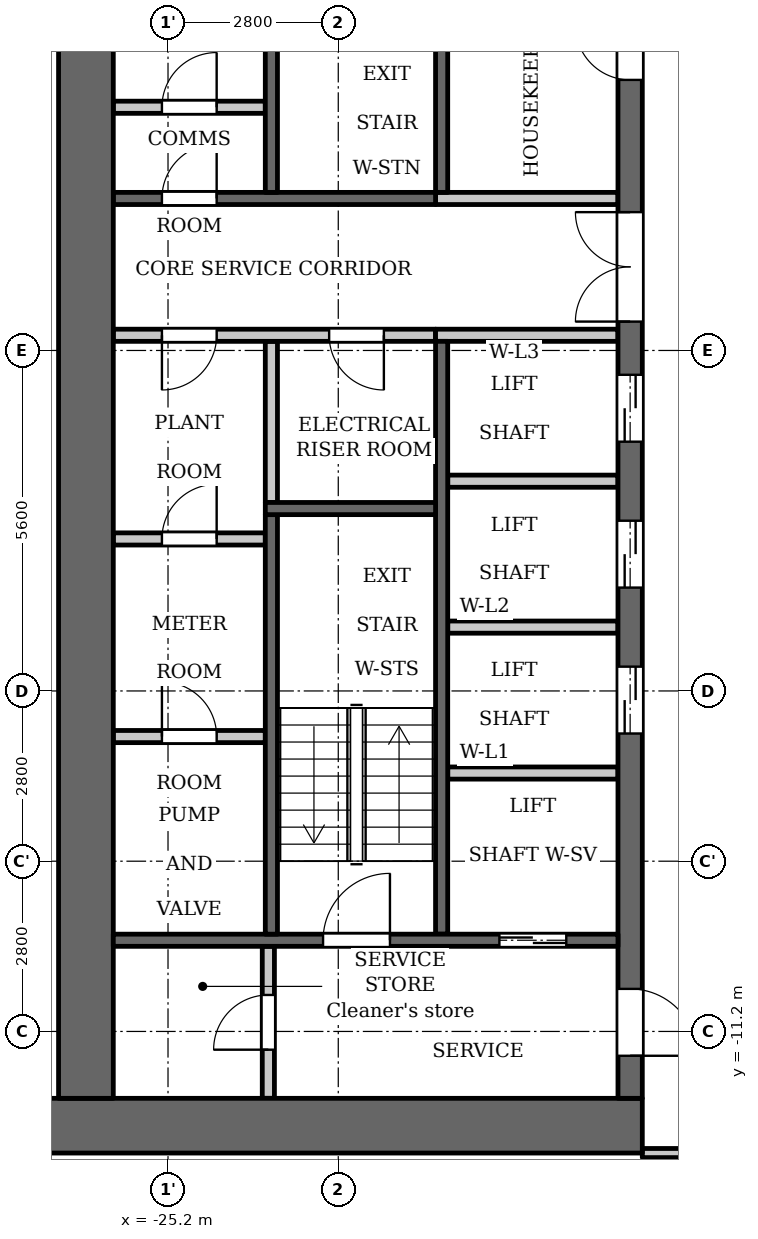
"""IFC4 building model, lengths in metres.
Left out: names, types, materials, properties, quantities, classifications, styles, units other than length and angle.
Written with IfcOpenShell. Run it as: python <this file> out.ifc"""

import sys

from ifc_helpers import new_model, si_unit, direction, frame, frame_2d, origin, place, context, subcontext, project, spatial, rectangle, extrude, element, fill, save


model = new_model("IFC4")
c1 = context("Model", 3, precision=1e-05, world=origin(), true_north=direction((0.0, 1.0)))
c2 = subcontext(c1, "Body", "Model", "MODEL_VIEW")
j1 = project(units=[si_unit("LENGTHUNIT", "METRE"), si_unit("PLANEANGLEUNIT", "RADIAN")], contexts=[c1])
p1 = place(None, origin())
s1 = spatial("IfcSite", under=j1, at=p1, CompositionType="ELEMENT")
p2 = place(p1, origin())
s2 = spatial("IfcBuilding", under=s1, at=p2, CompositionType="ELEMENT")
p3 = place(p2, frame((0.0, 0.0, 114.8)))
s3 = spatial("IfcBuildingStorey", under=s2, at=p3, CompositionType="ELEMENT", Elevation=114.8)
p4 = place(p3, frame((-23.5, -2.5, 0.0), z_axis=(0.0, 0.0, 1.0), x_axis=(0.0, 1.0, 0.0)))
e1 = element("IfcWall", 1, at=p4, inside=s3, PredefinedType="PARTITIONING", context=c2, shape_type="SweptSolid", body=[
    extrude(rectangle(XDim=2.65, YDim=0.2, at=frame_2d((1.325, 0.0))), origin(), (0.0, 0.0, 1.0), 3.2),
])
p5 = place(p3, frame((-20.7, 2.6, 0.0), z_axis=(0.0, 0.0, 1.0), x_axis=(0.0, 1.0, 0.0)))
e2 = element("IfcWall", 2, at=p5, inside=s3, PredefinedType="SHEAR", context=c2, shape_type="SweptSolid", body=[
    extrude(rectangle(XDim=7.0, YDim=0.2, at=frame_2d((3.5, 0.0))), origin(), (0.0, 0.0, 1.0), 3.2),
])
p6 = place(p3, frame((-20.7, -9.6, 0.0), z_axis=(0.0, 0.0, 1.0), x_axis=(0.0, 1.0, 0.0)))
e3 = element("IfcWall", 3, at=p6, inside=s3, PredefinedType="SHEAR", context=c2, shape_type="SweptSolid", body=[
    extrude(rectangle(XDim=9.75, YDim=0.2, at=frame_2d((4.875, 0.0))), origin(), (0.0, 0.0, 1.0), 3.2),
])
p7 = place(p3, frame((-20.8, 2.5, 0.0), z_axis=(0.0, 0.0, 1.0), x_axis=(-1.0, 0.0, 0.0)))
e4 = element("IfcWall", 4, at=p7, inside=s3, PredefinedType="SHEAR", context=c2, shape_type="SweptSolid", body=[
    extrude(rectangle(XDim=5.3, YDim=0.2, at=frame_2d((2.65, 0.0))), origin(), (0.0, 0.0, 1.0), 3.2),
])
p8 = place(p7, frame((3.6, 0.0, 0.0)))
e5 = element("IfcOpeningElement", 5, at=p8, cuts=e4, PredefinedType="OPENING", context=c2, shape_type="SweptSolid", body=[
    extrude(rectangle(XDim=0.9, YDim=2.1, at=frame_2d((0.45, 1.05))), frame((0.0, 0.11, 0.0), z_axis=(0.0, -1.0, 0.0), x_axis=(1.0, 0.0, 0.0)), (0.0, 0.0, 1.0), 0.22),
])
p9 = place(p3, frame((-20.8, 0.25, 0.0), z_axis=(0.0, 0.0, 1.0), x_axis=(-1.0, 0.0, 0.0)))
e6 = element("IfcWall", 6, at=p9, inside=s3, PredefinedType="PARTITIONING", context=c2, shape_type="SweptSolid", body=[
    extrude(rectangle(XDim=5.3, YDim=0.2, at=frame_2d((2.65, 0.0))), origin(), (0.0, 0.0, 1.0), 3.2),
])
p10 = place(p9, frame((0.85, 0.0, 0.0)))
e7 = element("IfcOpeningElement", 7, at=p10, cuts=e6, PredefinedType="OPENING", context=c2, shape_type="SweptSolid", body=[
    extrude(rectangle(XDim=0.9, YDim=2.1, at=frame_2d((0.45, 1.05))), frame((0.0, 0.11, 0.0), z_axis=(0.0, -1.0, 0.0), x_axis=(1.0, 0.0, 0.0)), (0.0, 0.0, 1.0), 0.22),
])
p11 = place(p9, frame((3.6, 0.0, 0.0)))
e8 = element("IfcOpeningElement", 8, at=p11, cuts=e6, PredefinedType="OPENING", context=c2, shape_type="SweptSolid", body=[
    extrude(rectangle(XDim=0.9, YDim=2.1, at=frame_2d((0.45, 1.05))), frame((0.0, 0.11, 0.0), z_axis=(0.0, -1.0, 0.0), x_axis=(1.0, 0.0, 0.0)), (0.0, 0.0, 1.0), 0.22),
])
p12 = place(p3, frame((-17.4, -12.75, 0.0), z_axis=(0.0, 0.0, 1.0), x_axis=(-1.0, 0.0, 0.0)))
e9 = element("IfcWall", 9, at=p12, inside=s3, PredefinedType="SHEAR", context=c2, shape_type="SweptSolid", body=[
    extrude(rectangle(XDim=10.4, YDim=0.9, at=frame_2d((5.2, 0.0))), origin(), (0.0, 0.0, 1.0), 3.2),
])
p13 = place(p3, frame((-17.6, -12.3, 0.0), z_axis=(0.0, 0.0, 1.0), x_axis=(0.0, 1.0, 0.0)))
e10 = element("IfcWall", 10, at=p13, inside=s3, PredefinedType="SHEAR", context=c2, shape_type="SweptSolid", body=[
    extrude(rectangle(XDim=24.6, YDim=0.4, at=frame_2d((12.3, 0.0))), origin(), (0.0, 0.0, 1.0), 3.2),
])
p14 = place(p13, frame((6.0, 0.0, 0.0)))
e11 = element("IfcOpeningElement", 11, at=p14, cuts=e10, PredefinedType="OPENING", context=c2, shape_type="SweptSolid", body=[
    extrude(rectangle(XDim=1.1, YDim=2.1, at=frame_2d((0.55, 1.05))), frame((0.0, 0.21, 0.0), z_axis=(0.0, -1.0, 0.0), x_axis=(1.0, 0.0, 0.0)), (0.0, 0.0, 1.0), 0.42),
])
p15 = place(p13, frame((8.4, 0.0, 0.0)))
e12 = element("IfcOpeningElement", 12, at=p15, cuts=e10, PredefinedType="OPENING", context=c2, shape_type="SweptSolid", body=[
    extrude(rectangle(XDim=1.1, YDim=2.1, at=frame_2d((0.55, 1.05))), frame((0.0, 0.21, 0.0), z_axis=(0.0, -1.0, 0.0), x_axis=(1.0, 0.0, 0.0)), (0.0, 0.0, 1.0), 0.42),
])
p16 = place(p13, frame((10.8, 0.0, 0.0)))
e13 = element("IfcOpeningElement", 13, at=p16, cuts=e10, PredefinedType="OPENING", context=c2, shape_type="SweptSolid", body=[
    extrude(rectangle(XDim=1.1, YDim=2.1, at=frame_2d((0.55, 1.05))), frame((0.0, 0.21, 0.0), z_axis=(0.0, -1.0, 0.0), x_axis=(1.0, 0.0, 0.0)), (0.0, 0.0, 1.0), 0.42),
])
p17 = place(p13, frame((16.75, 0.0, 0.0)))
e14 = element("IfcOpeningElement", 14, at=p17, cuts=e10, PredefinedType="OPENING", context=c2, shape_type="SweptSolid", body=[
    extrude(rectangle(XDim=0.9, YDim=2.1, at=frame_2d((0.45, 1.05))), frame((0.0, 0.21, 0.0), z_axis=(0.0, -1.0, 0.0), x_axis=(1.0, 0.0, 0.0)), (0.0, 0.0, 1.0), 0.42),
])
p18 = place(p13, frame((22.8, 0.0, 0.0)))
e15 = element("IfcOpeningElement", 15, at=p18, cuts=e10, PredefinedType="OPENING", context=c2, shape_type="SweptSolid", body=[
    extrude(rectangle(XDim=1.1, YDim=2.1, at=frame_2d((0.55, 1.05))), frame((0.0, 0.21, 0.0), z_axis=(0.0, -1.0, 0.0), x_axis=(1.0, 0.0, 0.0)), (0.0, 0.0, 1.0), 0.42),
])
p19 = place(p13, frame((0.7, 0.0, 0.0)))
e16 = element("IfcOpeningElement", 16, at=p19, cuts=e10, PredefinedType="OPENING", context=c2, shape_type="SweptSolid", body=[
    extrude(rectangle(XDim=1.1, YDim=2.1, at=frame_2d((0.55, 1.05))), frame((0.0, 0.21, 0.0), z_axis=(0.0, -1.0, 0.0), x_axis=(1.0, 0.0, 0.0)), (0.0, 0.0, 1.0), 0.42),
])
p20 = place(p13, frame((12.775, 0.0, 0.0)))
e17 = element("IfcOpeningElement", 17, at=p20, cuts=e10, PredefinedType="OPENING", context=c2, shape_type="SweptSolid", body=[
    extrude(rectangle(XDim=1.8, YDim=2.1, at=frame_2d((0.9, 1.05))), frame((0.0, 0.21, 0.0), z_axis=(0.0, -1.0, 0.0), x_axis=(1.0, 0.0, 0.0)), (0.0, 0.0, 1.0), 0.42),
])
p21 = place(p3, frame((-26.55, -12.3, 0.0), z_axis=(0.0, 0.0, 1.0), x_axis=(0.0, 1.0, 0.0)))
e18 = element("IfcWall", 18, at=p21, inside=s3, PredefinedType="SHEAR", context=c2, shape_type="SweptSolid", body=[
    extrude(rectangle(XDim=24.6, YDim=0.9, at=frame_2d((12.3, 0.0))), origin(), (0.0, 0.0, 1.0), 3.2),
])
p22 = place(p3, frame((-23.55, -12.3, 0.0), z_axis=(0.0, 0.0, 1.0), x_axis=(0.0, 1.0, 0.0)))
e19 = element("IfcWall", 19, at=p22, inside=s3, PredefinedType="PARTITIONING", context=c2, shape_type="SweptSolid", body=[
    extrude(rectangle(XDim=2.5, YDim=0.2, at=frame_2d((1.25, 0.0))), origin(), (0.0, 0.0, 1.0), 3.2),
])
p23 = place(p22, frame((0.8, 0.0, 0.0)))
e20 = element("IfcOpeningElement", 20, at=p23, cuts=e19, PredefinedType="OPENING", context=c2, shape_type="SweptSolid", body=[
    extrude(rectangle(XDim=0.9, YDim=2.1, at=frame_2d((0.45, 1.05))), frame((0.0, 0.11, 0.0), z_axis=(0.0, -1.0, 0.0), x_axis=(1.0, 0.0, 0.0)), (0.0, 0.0, 1.0), 0.22),
])
p24 = place(p3, frame((-23.6, -6.35, 0.0), z_axis=(0.0, 0.0, 1.0), x_axis=(-1.0, 0.0, 0.0)))
e21 = element("IfcWall", 21, at=p24, inside=s3, PredefinedType="PARTITIONING", context=c2, shape_type="SweptSolid", body=[
    extrude(rectangle(XDim=2.5, YDim=0.2, at=frame_2d((1.25, 0.0))), origin(), (0.0, 0.0, 1.0), 3.2),
])
p25 = place(p24, frame((0.8, 0.0, 0.0)))
e22 = element("IfcOpeningElement", 22, at=p25, cuts=e21, PredefinedType="OPENING", context=c2, shape_type="SweptSolid", body=[
    extrude(rectangle(XDim=0.9, YDim=2.1, at=frame_2d((0.45, 1.05))), frame((0.0, 0.11, 0.0), z_axis=(0.0, -1.0, 0.0), x_axis=(1.0, 0.0, 0.0)), (0.0, 0.0, 1.0), 0.22),
])
p26 = place(p3, frame((-23.6, -3.1, 0.0), z_axis=(0.0, 0.0, 1.0), x_axis=(-1.0, 0.0, 0.0)))
e23 = element("IfcWall", 23, at=p26, inside=s3, PredefinedType="PARTITIONING", context=c2, shape_type="SweptSolid", body=[
    extrude(rectangle(XDim=2.5, YDim=0.2, at=frame_2d((1.25, 0.0))), origin(), (0.0, 0.0, 1.0), 3.2),
])
p27 = place(p26, frame((0.8, 0.0, 0.0)))
e24 = element("IfcOpeningElement", 24, at=p27, cuts=e23, PredefinedType="OPENING", context=c2, shape_type="SweptSolid", body=[
    extrude(rectangle(XDim=0.9, YDim=2.1, at=frame_2d((0.45, 1.05))), frame((0.0, 0.11, 0.0), z_axis=(0.0, -1.0, 0.0), x_axis=(1.0, 0.0, 0.0)), (0.0, 0.0, 1.0), 0.22),
])
p28 = place(p3, frame((-23.6, 4.0, 0.0), z_axis=(0.0, 0.0, 1.0), x_axis=(-1.0, 0.0, 0.0)))
e25 = element("IfcWall", 25, at=p28, inside=s3, PredefinedType="PARTITIONING", context=c2, shape_type="SweptSolid", body=[
    extrude(rectangle(XDim=2.5, YDim=0.2, at=frame_2d((1.25, 0.0))), origin(), (0.0, 0.0, 1.0), 3.2),
])
p29 = place(p28, frame((0.8, 0.0, 0.0)))
e26 = element("IfcOpeningElement", 26, at=p29, cuts=e25, PredefinedType="OPENING", context=c2, shape_type="SweptSolid", body=[
    extrude(rectangle(XDim=0.9, YDim=2.1, at=frame_2d((0.45, 1.05))), frame((0.0, 0.11, 0.0), z_axis=(0.0, -1.0, 0.0), x_axis=(1.0, 0.0, 0.0)), (0.0, 0.0, 1.0), 0.22),
])
p30 = place(p3, frame((-17.8, -9.7, 0.0), z_axis=(0.0, 0.0, 1.0), x_axis=(-1.0, 0.0, 0.0)))
e27 = element("IfcWall", 27, at=p30, inside=s3, PredefinedType="SHEAR", context=c2, shape_type="SweptSolid", body=[
    extrude(rectangle(XDim=8.3, YDim=0.2, at=frame_2d((4.15, 0.0))), origin(), (0.0, 0.0, 1.0), 3.2),
])
p31 = place(p30, frame((0.85, 0.0, 0.0)))
e28 = element("IfcOpeningElement", 28, at=p31, cuts=e27, PredefinedType="OPENING", context=c2, shape_type="SweptSolid", body=[
    extrude(rectangle(XDim=1.1, YDim=2.1, at=frame_2d((0.55, 1.05))), frame((0.0, 0.11, 0.0), z_axis=(0.0, -1.0, 0.0), x_axis=(1.0, 0.0, 0.0)), (0.0, 0.0, 1.0), 0.22),
])
p32 = place(p30, frame((3.75, 0.0, 0.0)))
e29 = element("IfcOpeningElement", 29, at=p32, cuts=e27, PredefinedType="OPENING", context=c2, shape_type="SweptSolid", body=[
    extrude(rectangle(XDim=1.1, YDim=2.1, at=frame_2d((0.55, 1.05))), frame((0.0, 0.11, 0.0), z_axis=(0.0, -1.0, 0.0), x_axis=(1.0, 0.0, 0.0)), (0.0, 0.0, 1.0), 0.22),
])
for number, where, z_axis, x_axis in (
    (30, (-17.8, -6.95, 0.0), (0.0, 0.0, 1.0), (-1.0, 0.0, 0.0)),
    (31, (-17.8, -4.55, 0.0), (0.0, 0.0, 1.0), (-1.0, 0.0, 0.0)),
    (32, (-17.8, -2.15, 0.0), (0.0, 0.0, 1.0), (-1.0, 0.0, 0.0)),
):
    element("IfcWall", number, at=place(p3, frame(where, z_axis=z_axis, x_axis=x_axis)), inside=s3, PredefinedType="PARTITIONING", context=c2, shape_type="SweptSolid", body=[
        extrude(rectangle(XDim=2.8, YDim=0.2, at=frame_2d((1.4, 0.0))), origin(), (0.0, 0.0, 1.0), 3.2),
    ])
for number, where, z_axis, x_axis in (
    (33, (-17.8, 0.25, 0.0), (0.0, 0.0, 1.0), (-1.0, 0.0, 0.0)),
    (34, (-17.8, 2.5, 0.0), (0.0, 0.0, 1.0), (-1.0, 0.0, 0.0)),
):
    element("IfcWall", number, at=place(p3, frame(where, z_axis=z_axis, x_axis=x_axis)), inside=s3, PredefinedType="PARTITIONING", context=c2, shape_type="SweptSolid", body=[
        extrude(rectangle(XDim=3.0, YDim=0.2, at=frame_2d((1.5, 0.0))), origin(), (0.0, 0.0, 1.0), 3.2),
    ])
p33 = place(p3, frame((-23.5, 2.6, 0.0), z_axis=(0.0, 0.0, 1.0), x_axis=(0.0, 1.0, 0.0)))
e35 = element("IfcWall", 35, at=p33, inside=s3, PredefinedType="SHEAR", context=c2, shape_type="SweptSolid", body=[
    extrude(rectangle(XDim=7.0, YDim=0.2, at=frame_2d((3.5, 0.0))), origin(), (0.0, 0.0, 1.0), 3.2),
])
p34 = place(p3, frame((-23.5, -9.6, 0.0), z_axis=(0.0, 0.0, 1.0), x_axis=(0.0, 1.0, 0.0)))
e36 = element("IfcWall", 36, at=p34, inside=s3, PredefinedType="SHEAR", context=c2, shape_type="SweptSolid", body=[
    extrude(rectangle(XDim=6.9, YDim=0.2, at=frame_2d((3.45, 0.0))), origin(), (0.0, 0.0, 1.0), 3.2),
])
p35 = place(p3, frame((-20.8, -2.6, 0.0), z_axis=(0.0, 0.0, 1.0), x_axis=(-1.0, 0.0, 0.0)))
e37 = element("IfcWall", 37, at=p35, inside=s3, PredefinedType="SHEAR", context=c2, shape_type="SweptSolid", body=[
    extrude(rectangle(XDim=2.8, YDim=0.2, at=frame_2d((1.4, 0.0))), origin(), (0.0, 0.0, 1.0), 3.2),
])
p36 = place(p3, frame((-17.4, -13.2, 0.0), z_axis=(0.0, 0.0, 1.0), x_axis=(1.0, 0.0, 0.0)))
e38 = element("IfcWall", 38, at=p36, inside=s3, PredefinedType="PARTITIONING", context=c2, shape_type="SweptSolid", body=[
    extrude(rectangle(XDim=34.8, YDim=0.15, at=frame_2d((17.4, 0.0))), origin(), (0.0, 0.0, 1.0), 3.2),
])
p37 = place(p36, frame((0.65, 0.0, 0.0)))
e39 = element("IfcOpeningElement", 39, at=p37, cuts=e38, PredefinedType="OPENING", context=c2, shape_type="SweptSolid", body=[
    extrude(rectangle(XDim=1.0, YDim=2.1, at=frame_2d((0.5, 1.05))), frame((0.0, 0.085, 0.0), z_axis=(0.0, -1.0, 0.0), x_axis=(1.0, 0.0, 0.0)), (0.0, 0.0, 1.0), 0.17),
])
p38 = place(p36, frame((33.05, 0.0, 0.0)))
e40 = element("IfcOpeningElement", 40, at=p38, cuts=e38, PredefinedType="OPENING", context=c2, shape_type="SweptSolid", body=[
    extrude(rectangle(XDim=1.0, YDim=2.1, at=frame_2d((0.5, 1.05))), frame((0.0, 0.085, 0.0), z_axis=(0.0, -1.0, 0.0), x_axis=(1.0, 0.0, 0.0)), (0.0, 0.0, 1.0), 0.17),
])
p39 = place(p36, frame((4.55, 0.0, 0.0)))
e41 = element("IfcOpeningElement", 41, at=p39, cuts=e38, PredefinedType="OPENING", context=c2, shape_type="SweptSolid", body=[
    extrude(rectangle(XDim=1.0, YDim=2.1, at=frame_2d((0.5, 1.05))), frame((0.0, 0.085, 0.0), z_axis=(0.0, -1.0, 0.0), x_axis=(1.0, 0.0, 0.0)), (0.0, 0.0, 1.0), 0.17),
])
p40 = place(p36, frame((6.9, 0.0, 0.0)))
e42 = element("IfcOpeningElement", 42, at=p40, cuts=e38, PredefinedType="OPENING", context=c2, shape_type="SweptSolid", body=[
    extrude(rectangle(XDim=1.0, YDim=2.1, at=frame_2d((0.5, 1.05))), frame((0.0, 0.085, 0.0), z_axis=(0.0, -1.0, 0.0), x_axis=(1.0, 0.0, 0.0)), (0.0, 0.0, 1.0), 0.17),
])
p41 = place(p36, frame((15.75, 0.0, 0.0)))
e43 = element("IfcOpeningElement", 43, at=p41, cuts=e38, PredefinedType="OPENING", context=c2, shape_type="SweptSolid", body=[
    extrude(rectangle(XDim=1.0, YDim=2.1, at=frame_2d((0.5, 1.05))), frame((0.0, 0.085, 0.0), z_axis=(0.0, -1.0, 0.0), x_axis=(1.0, 0.0, 0.0)), (0.0, 0.0, 1.0), 0.17),
])
p42 = place(p36, frame((18.1, 0.0, 0.0)))
e44 = element("IfcOpeningElement", 44, at=p42, cuts=e38, PredefinedType="OPENING", context=c2, shape_type="SweptSolid", body=[
    extrude(rectangle(XDim=1.0, YDim=2.1, at=frame_2d((0.5, 1.05))), frame((0.0, 0.085, 0.0), z_axis=(0.0, -1.0, 0.0), x_axis=(1.0, 0.0, 0.0)), (0.0, 0.0, 1.0), 0.17),
])
p43 = place(p36, frame((26.95, 0.0, 0.0)))
e45 = element("IfcOpeningElement", 45, at=p43, cuts=e38, PredefinedType="OPENING", context=c2, shape_type="SweptSolid", body=[
    extrude(rectangle(XDim=1.0, YDim=2.1, at=frame_2d((0.5, 1.05))), frame((0.0, 0.085, 0.0), z_axis=(0.0, -1.0, 0.0), x_axis=(1.0, 0.0, 0.0)), (0.0, 0.0, 1.0), 0.17),
])
p44 = place(p36, frame((29.25, 0.0, 0.0)))
e46 = element("IfcOpeningElement", 46, at=p44, cuts=e38, PredefinedType="OPENING", context=c2, shape_type="SweptSolid", body=[
    extrude(rectangle(XDim=1.0, YDim=2.1, at=frame_2d((0.5, 1.05))), frame((0.0, 0.085, 0.0), z_axis=(0.0, -1.0, 0.0), x_axis=(1.0, 0.0, 0.0)), (0.0, 0.0, 1.0), 0.17),
])
p45 = place(p31, origin())
e47 = element("IfcDoor", 47, at=p45, inside=s3, OperationType="DOUBLE_DOOR_SLIDING", PredefinedType="DOOR", context=c2, shape_type="SweptSolid", body=[
    extrude(rectangle(XDim=1.1, YDim=2.1, at=frame_2d((0.55, 1.05))), frame((0.0, 0.025, 0.0), z_axis=(0.0, -1.0, 0.0), x_axis=(1.0, 0.0, 0.0)), (0.0, 0.0, 1.0), 0.05),
])
fill(e28, e47)
p46 = place(p14, origin())
e48 = element("IfcDoor", 48, at=p46, inside=s3, OperationType="DOUBLE_DOOR_SLIDING", PredefinedType="DOOR", context=c2, shape_type="SweptSolid", body=[
    extrude(rectangle(XDim=1.1, YDim=2.1, at=frame_2d((0.55, 1.05))), frame((0.0, 0.025, 0.0), z_axis=(0.0, -1.0, 0.0), x_axis=(1.0, 0.0, 0.0)), (0.0, 0.0, 1.0), 0.05),
])
fill(e11, e48)
p47 = place(p15, origin())
e49 = element("IfcDoor", 49, at=p47, inside=s3, OperationType="DOUBLE_DOOR_SLIDING", PredefinedType="DOOR", context=c2, shape_type="SweptSolid", body=[
    extrude(rectangle(XDim=1.1, YDim=2.1, at=frame_2d((0.55, 1.05))), frame((0.0, 0.025, 0.0), z_axis=(0.0, -1.0, 0.0), x_axis=(1.0, 0.0, 0.0)), (0.0, 0.0, 1.0), 0.05),
])
fill(e12, e49)
p48 = place(p16, origin())
e50 = element("IfcDoor", 50, at=p48, inside=s3, OperationType="DOUBLE_DOOR_SLIDING", PredefinedType="DOOR", context=c2, shape_type="SweptSolid", body=[
    extrude(rectangle(XDim=1.1, YDim=2.1, at=frame_2d((0.55, 1.05))), frame((0.0, 0.025, 0.0), z_axis=(0.0, -1.0, 0.0), x_axis=(1.0, 0.0, 0.0)), (0.0, 0.0, 1.0), 0.05),
])
fill(e13, e50)
p49 = place(p17, origin())
e51 = element("IfcDoor", 51, at=p49, inside=s3, OperationType="SINGLE_SWING_LEFT", PredefinedType="DOOR", context=c2, shape_type="SweptSolid", body=[
    extrude(rectangle(XDim=0.9, YDim=2.1, at=frame_2d((0.45, 1.05))), frame((0.0, 0.025, 0.0), z_axis=(0.0, -1.0, 0.0), x_axis=(1.0, 0.0, 0.0)), (0.0, 0.0, 1.0), 0.05),
])
fill(e14, e51)
p50 = place(p19, origin())
e52 = element("IfcDoor", 52, at=p50, inside=s3, OperationType="SINGLE_SWING_LEFT", PredefinedType="DOOR", context=c2, shape_type="SweptSolid", body=[
    extrude(rectangle(XDim=1.1, YDim=2.1, at=frame_2d((0.55, 1.05))), frame((0.0, 0.025, 0.0), z_axis=(0.0, -1.0, 0.0), x_axis=(1.0, 0.0, 0.0)), (0.0, 0.0, 1.0), 0.05),
])
fill(e16, e52)
p51 = place(p23, origin())
e53 = element("IfcDoor", 53, at=p51, inside=s3, OperationType="SINGLE_SWING_RIGHT", PredefinedType="DOOR", context=c2, shape_type="SweptSolid", body=[
    extrude(rectangle(XDim=0.9, YDim=2.1, at=frame_2d((0.45, 1.05))), frame((0.0, 0.025, 0.0), z_axis=(0.0, -1.0, 0.0), x_axis=(1.0, 0.0, 0.0)), (0.0, 0.0, 1.0), 0.05),
])
fill(e20, e53)
p52 = place(p32, origin())
e54 = element("IfcDoor", 54, at=p52, inside=s3, OperationType="SINGLE_SWING_LEFT", PredefinedType="DOOR", context=c2, shape_type="SweptSolid", body=[
    extrude(rectangle(XDim=1.1, YDim=2.1, at=frame_2d((0.55, 1.05))), frame((0.0, 0.025, 0.0), z_axis=(0.0, -1.0, 0.0), x_axis=(1.0, 0.0, 0.0)), (0.0, 0.0, 1.0), 0.05),
])
fill(e29, e54)
p53 = place(p20, origin())
e55 = element("IfcDoor", 55, at=p53, inside=s3, OperationType="DOUBLE_DOOR_SINGLE_SWING", PredefinedType="DOOR", context=c2, shape_type="SweptSolid", body=[
    extrude(rectangle(XDim=1.8, YDim=2.1, at=frame_2d((0.9, 1.05))), frame((0.0, 0.025, 0.0), z_axis=(0.0, -1.0, 0.0), x_axis=(1.0, 0.0, 0.0)), (0.0, 0.0, 1.0), 0.05),
])
fill(e17, e55)
p54 = place(p10, origin())
e56 = element("IfcDoor", 56, at=p54, inside=s3, OperationType="SINGLE_SWING_RIGHT", PredefinedType="DOOR", context=c2, shape_type="SweptSolid", body=[
    extrude(rectangle(XDim=0.9, YDim=2.1, at=frame_2d((0.45, 1.05))), frame((0.0, 0.025, 0.0), z_axis=(0.0, -1.0, 0.0), x_axis=(1.0, 0.0, 0.0)), (0.0, 0.0, 1.0), 0.05),
])
fill(e7, e56)
p55 = place(p25, origin())
e57 = element("IfcDoor", 57, at=p55, inside=s3, OperationType="SINGLE_SWING_RIGHT", PredefinedType="DOOR", context=c2, shape_type="SweptSolid", body=[
    extrude(rectangle(XDim=0.9, YDim=2.1, at=frame_2d((0.45, 1.05))), frame((0.0, 0.025, 0.0), z_axis=(0.0, -1.0, 0.0), x_axis=(1.0, 0.0, 0.0)), (0.0, 0.0, 1.0), 0.05),
])
fill(e22, e57)
p56 = place(p27, origin())
e58 = element("IfcDoor", 58, at=p56, inside=s3, OperationType="SINGLE_SWING_LEFT", PredefinedType="DOOR", context=c2, shape_type="SweptSolid", body=[
    extrude(rectangle(XDim=0.9, YDim=2.1, at=frame_2d((0.45, 1.05))), frame((0.0, 0.025, 0.0), z_axis=(0.0, -1.0, 0.0), x_axis=(1.0, 0.0, 0.0)), (0.0, 0.0, 1.0), 0.05),
])
fill(e24, e58)
p57 = place(p11, origin())
e59 = element("IfcDoor", 59, at=p57, inside=s3, OperationType="SINGLE_SWING_LEFT", PredefinedType="DOOR", context=c2, shape_type="SweptSolid", body=[
    extrude(rectangle(XDim=0.9, YDim=2.1, at=frame_2d((0.45, 1.05))), frame((0.0, 0.025, 0.0), z_axis=(0.0, -1.0, 0.0), x_axis=(1.0, 0.0, 0.0)), (0.0, 0.0, 1.0), 0.05),
])
fill(e8, e59)
p58 = place(p29, origin())
e60 = element("IfcDoor", 60, at=p58, inside=s3, OperationType="SINGLE_SWING_LEFT", PredefinedType="DOOR", context=c2, shape_type="SweptSolid", body=[
    extrude(rectangle(XDim=0.9, YDim=2.1, at=frame_2d((0.45, 1.05))), frame((0.0, 0.025, 0.0), z_axis=(0.0, -1.0, 0.0), x_axis=(1.0, 0.0, 0.0)), (0.0, 0.0, 1.0), 0.05),
])
fill(e26, e60)
p59 = place(p8, origin())
e61 = element("IfcDoor", 61, at=p59, inside=s3, OperationType="SINGLE_SWING_LEFT", PredefinedType="DOOR", context=c2, shape_type="SweptSolid", body=[
    extrude(rectangle(XDim=0.9, YDim=2.1, at=frame_2d((0.45, 1.05))), frame((0.0, 0.025, 0.0), z_axis=(0.0, -1.0, 0.0), x_axis=(1.0, 0.0, 0.0)), (0.0, 0.0, 1.0), 0.05),
])
fill(e5, e61)
save(model, sys.argv[1])
